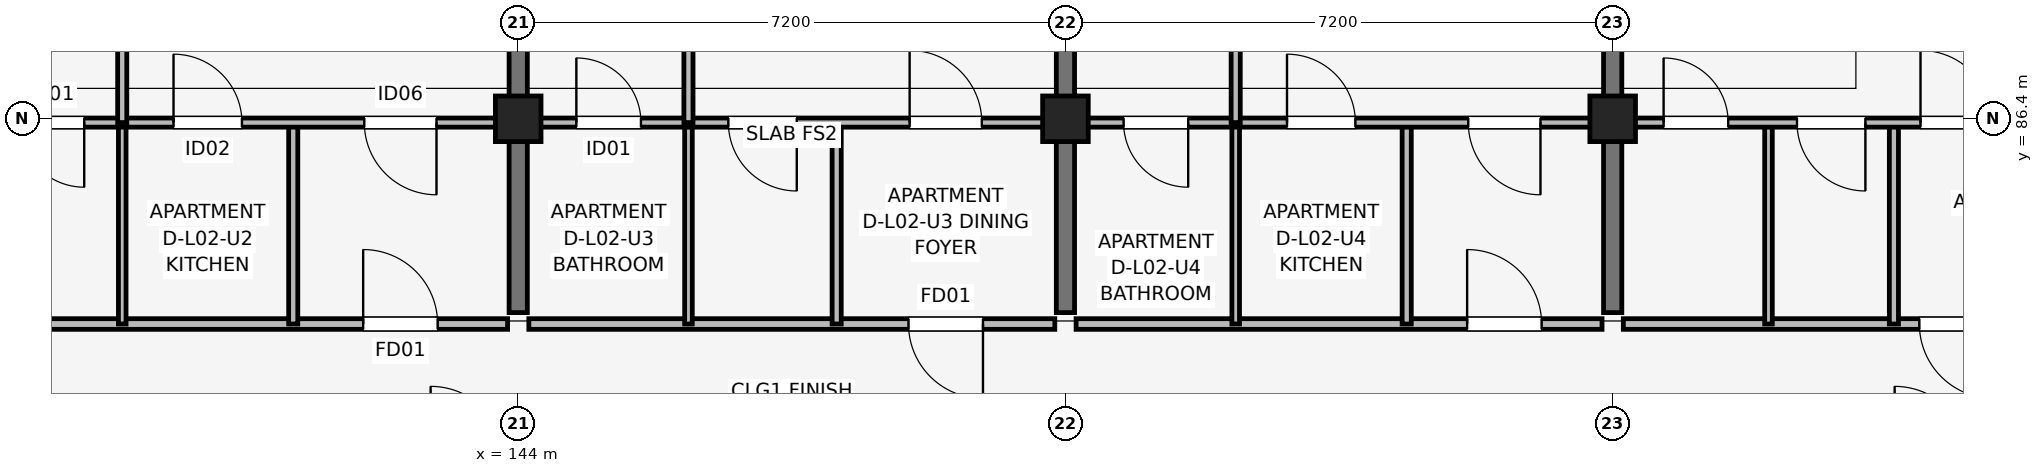
"""IFC4 building model, lengths in metres.
Left out: names, types, materials, properties, quantities, classifications, styles, units other than length and angle.
Written with IfcOpenShell. Run it as: python <this file> out.ifc"""

import sys

from ifc_helpers import new_model, si_unit, direction, frame, frame_2d, origin, origin_2d, place, context, subcontext, project, spatial, rectangle, extrude, element, fill, save


model = new_model("IFC4")
c1 = context("Model", 3, precision=1e-05, world=origin(), true_north=direction((0.0, 1.0)))
c2 = subcontext(c1, "Body", "Model", "MODEL_VIEW")
j1 = project(units=[si_unit("LENGTHUNIT", "METRE"), si_unit("PLANEANGLEUNIT", "RADIAN")], contexts=[c1])
p1 = place(None, origin())
s1 = spatial("IfcSite", under=j1, at=p1, CompositionType="ELEMENT")
p2 = place(p1, origin())
s2 = spatial("IfcBuilding", under=s1, at=p2, CompositionType="ELEMENT")
p3 = place(p2, frame((0.0, 0.0, 8.7)))
s3 = spatial("IfcBuildingStorey", under=s2, at=p3, CompositionType="ELEMENT", Elevation=8.7)
for number, where, z_axis, x_axis in (
    (1, (144.0, 86.4, 0.0), (0.0, 0.0, 1.0), (1.0, 0.0, 0.0)),
    (2, (151.2, 86.4, 0.0), (0.0, 0.0, 1.0), (1.0, 0.0, 0.0)),
    (3, (158.4, 86.4, 0.0), (0.0, 0.0, 1.0), (1.0, 0.0, 0.0)),
):
    element("IfcColumn", number, at=place(p3, frame(where, z_axis=z_axis, x_axis=x_axis)), inside=s3, PredefinedType="COLUMN", context=c2, shape_type="SweptSolid", body=[
        extrude(rectangle(XDim=0.6, YDim=0.6, at=origin_2d()), origin(), (0.0, 0.0, 1.0), 3.15),
    ])
for number, where, z_axis, x_axis in (
    (4, (144.0, 83.85, 0.0), (0.0, 0.0, 1.0), (0.0, 1.0, 0.0)),
    (5, (151.2, 83.85, 0.0), (0.0, 0.0, 1.0), (0.0, 1.0, 0.0)),
    (6, (158.4, 83.85, 0.0), (0.0, 0.0, 1.0), (0.0, 1.0, 0.0)),
):
    element("IfcWall", number, at=place(p3, frame(where, z_axis=z_axis, x_axis=x_axis)), inside=s3, PredefinedType="SHEAR", context=c2, shape_type="SweptSolid", body=[
        extrude(rectangle(XDim=9.4, YDim=0.24, at=frame_2d((4.7, 0.0))), origin(), (0.0, 0.0, 1.0), 3.15),
    ])
p4 = place(p3, frame((136.94, 83.7, 0.0), z_axis=(0.0, 0.0, 1.0), x_axis=(1.0, 0.0, 0.0)))
e7 = element("IfcWall", 7, at=p4, inside=s3, PredefinedType="PARTITIONING", context=c2, shape_type="SweptSolid", body=[
    extrude(rectangle(XDim=6.92, YDim=0.14, at=frame_2d((3.46, 0.0))), origin(), (0.0, 0.0, 1.0), 2.38),
])
p5 = place(p4, frame((5.02, 0.0, 0.0)))
e8 = element("IfcOpeningElement", 8, at=p5, cuts=e7, PredefinedType="OPENING", context=c2, shape_type="SweptSolid", body=[
    extrude(rectangle(XDim=0.98, YDim=2.1, at=frame_2d((0.49, 1.05))), frame((0.0, 0.08, 0.0), z_axis=(0.0, -1.0, 0.0), x_axis=(1.0, 0.0, 0.0)), (0.0, 0.0, 1.0), 0.16),
])
p6 = place(p3, frame((138.79, 83.7, 0.0), z_axis=(0.0, 0.0, 1.0), x_axis=(0.0, 1.0, 0.0)))
e9 = element("IfcWall", 9, at=p6, inside=s3, PredefinedType="PARTITIONING", context=c2, shape_type="SweptSolid", body=[
    extrude(rectangle(XDim=2.65, YDim=0.1, at=frame_2d((1.325, 0.0))), origin(), (0.0, 0.0, 1.0), 2.375),
])
p7 = place(p3, frame((141.04, 83.7, 0.0), z_axis=(0.0, 0.0, 1.0), x_axis=(0.0, 1.0, 0.0)))
e10 = element("IfcWall", 10, at=p7, inside=s3, PredefinedType="PARTITIONING", context=c2, shape_type="SweptSolid", body=[
    extrude(rectangle(XDim=2.65, YDim=0.12, at=frame_2d((1.325, 0.0))), origin(), (0.0, 0.0, 1.0), 2.375),
])
p8 = place(p3, frame((136.94, 86.35, 0.0), z_axis=(0.0, 0.0, 1.0), x_axis=(1.0, 0.0, 0.0)))
e11 = element("IfcWall", 11, at=p8, inside=s3, PredefinedType="PARTITIONING", context=c2, shape_type="SweptSolid", body=[
    extrude(rectangle(XDim=6.92, YDim=0.12, at=frame_2d((3.46, 0.0))), origin(), (0.0, 0.0, 1.0), 2.375),
])
p9 = place(p8, frame((1.35, 0.0, 0.0), z_axis=(0.0, 0.0, 1.0), x_axis=(-1.0, 0.0, 0.0)))
e12 = element("IfcOpeningElement", 12, at=p9, cuts=e11, PredefinedType="OPENING", context=c2, shape_type="SweptSolid", body=[
    extrude(rectangle(XDim=0.85, YDim=2.08, at=frame_2d((0.425, 1.04))), frame((0.0, 0.07, 0.0), z_axis=(0.0, -1.0, 0.0), x_axis=(1.0, 0.0, 0.0)), (0.0, 0.0, 1.0), 0.14),
])
p10 = place(p8, frame((2.525, 0.0, 0.0)))
e13 = element("IfcOpeningElement", 13, at=p10, cuts=e11, PredefinedType="OPENING", context=c2, shape_type="SweptSolid", body=[
    extrude(rectangle(XDim=0.9, YDim=2.08, at=frame_2d((0.45, 1.04))), frame((0.0, 0.07, 0.0), z_axis=(0.0, -1.0, 0.0), x_axis=(1.0, 0.0, 0.0)), (0.0, 0.0, 1.0), 0.14),
])
p11 = place(p8, frame((5.985, 0.0, 0.0), z_axis=(0.0, 0.0, 1.0), x_axis=(-1.0, 0.0, 0.0)))
e14 = element("IfcOpeningElement", 14, at=p11, cuts=e11, PredefinedType="OPENING", context=c2, shape_type="SweptSolid", body=[
    extrude(rectangle(XDim=0.95, YDim=2.08, at=frame_2d((0.475, 1.04))), frame((0.0, 0.07, 0.0), z_axis=(0.0, -1.0, 0.0), x_axis=(1.0, 0.0, 0.0)), (0.0, 0.0, 1.0), 0.14),
])
p12 = place(p3, frame((138.79, 86.35, 0.0), z_axis=(0.0, 0.0, 1.0), x_axis=(0.0, 1.0, 0.0)))
e15 = element("IfcWall", 15, at=p12, inside=s3, PredefinedType="PARTITIONING", context=c2, shape_type="SweptSolid", body=[
    extrude(rectangle(XDim=6.95, YDim=0.12, at=frame_2d((3.475, 0.0))), origin(), (0.0, 0.0, 1.0), 2.375),
])
p13 = place(p12, frame((3.025, 0.0, 0.0)))
e16 = element("IfcOpeningElement", 16, at=p13, cuts=e15, PredefinedType="OPENING", context=c2, shape_type="SweptSolid", body=[
    extrude(rectangle(XDim=0.9, YDim=2.08, at=frame_2d((0.45, 1.04))), frame((0.0, 0.07, 0.0), z_axis=(0.0, -1.0, 0.0), x_axis=(1.0, 0.0, 0.0)), (0.0, 0.0, 1.0), 0.14),
])
p14 = place(p3, frame((144.14, 83.7, 0.0), z_axis=(0.0, 0.0, 1.0), x_axis=(1.0, 0.0, 0.0)))
e17 = element("IfcWall", 17, at=p14, inside=s3, PredefinedType="PARTITIONING", context=c2, shape_type="SweptSolid", body=[
    extrude(rectangle(XDim=6.92, YDim=0.14, at=frame_2d((3.46, 0.0))), origin(), (0.0, 0.0, 1.0), 2.38),
])
p15 = place(p14, frame((5.975, 0.0, 0.0), z_axis=(0.0, 0.0, 1.0), x_axis=(-1.0, 0.0, 0.0)))
e18 = element("IfcOpeningElement", 18, at=p15, cuts=e17, PredefinedType="OPENING", context=c2, shape_type="SweptSolid", body=[
    extrude(rectangle(XDim=0.98, YDim=2.1, at=frame_2d((0.49, 1.05))), frame((0.0, 0.08, 0.0), z_axis=(0.0, -1.0, 0.0), x_axis=(1.0, 0.0, 0.0)), (0.0, 0.0, 1.0), 0.16),
])
p16 = place(p3, frame((146.24, 83.7, 0.0), z_axis=(0.0, 0.0, 1.0), x_axis=(0.0, 1.0, 0.0)))
e19 = element("IfcWall", 19, at=p16, inside=s3, PredefinedType="PARTITIONING", context=c2, shape_type="SweptSolid", body=[
    extrude(rectangle(XDim=2.65, YDim=0.1, at=frame_2d((1.325, 0.0))), origin(), (0.0, 0.0, 1.0), 2.375),
])
p17 = place(p3, frame((148.19, 83.7, 0.0), z_axis=(0.0, 0.0, 1.0), x_axis=(0.0, 1.0, 0.0)))
e20 = element("IfcWall", 20, at=p17, inside=s3, PredefinedType="PARTITIONING", context=c2, shape_type="SweptSolid", body=[
    extrude(rectangle(XDim=2.65, YDim=0.12, at=frame_2d((1.325, 0.0))), origin(), (0.0, 0.0, 1.0), 2.375),
])
p18 = place(p3, frame((144.14, 86.35, 0.0), z_axis=(0.0, 0.0, 1.0), x_axis=(1.0, 0.0, 0.0)))
e21 = element("IfcWall", 21, at=p18, inside=s3, PredefinedType="PARTITIONING", context=c2, shape_type="SweptSolid", body=[
    extrude(rectangle(XDim=6.92, YDim=0.12, at=frame_2d((3.46, 0.0))), origin(), (0.0, 0.0, 1.0), 2.375),
])
p19 = place(p18, frame((0.625, 0.0, 0.0)))
e22 = element("IfcOpeningElement", 22, at=p19, cuts=e21, PredefinedType="OPENING", context=c2, shape_type="SweptSolid", body=[
    extrude(rectangle(XDim=0.85, YDim=2.08, at=frame_2d((0.425, 1.04))), frame((0.0, 0.07, 0.0), z_axis=(0.0, -1.0, 0.0), x_axis=(1.0, 0.0, 0.0)), (0.0, 0.0, 1.0), 0.14),
])
p20 = place(p18, frame((3.525, 0.0, 0.0), z_axis=(0.0, 0.0, 1.0), x_axis=(-1.0, 0.0, 0.0)))
e23 = element("IfcOpeningElement", 23, at=p20, cuts=e21, PredefinedType="OPENING", context=c2, shape_type="SweptSolid", body=[
    extrude(rectangle(XDim=0.9, YDim=2.08, at=frame_2d((0.45, 1.04))), frame((0.0, 0.07, 0.0), z_axis=(0.0, -1.0, 0.0), x_axis=(1.0, 0.0, 0.0)), (0.0, 0.0, 1.0), 0.14),
])
p21 = place(p18, frame((5.01, 0.0, 0.0)))
e24 = element("IfcOpeningElement", 24, at=p21, cuts=e21, PredefinedType="OPENING", context=c2, shape_type="SweptSolid", body=[
    extrude(rectangle(XDim=0.95, YDim=2.08, at=frame_2d((0.475, 1.04))), frame((0.0, 0.07, 0.0), z_axis=(0.0, -1.0, 0.0), x_axis=(1.0, 0.0, 0.0)), (0.0, 0.0, 1.0), 0.14),
])
p22 = place(p3, frame((146.24, 86.35, 0.0), z_axis=(0.0, 0.0, 1.0), x_axis=(0.0, 1.0, 0.0)))
e25 = element("IfcWall", 25, at=p22, inside=s3, PredefinedType="PARTITIONING", context=c2, shape_type="SweptSolid", body=[
    extrude(rectangle(XDim=6.95, YDim=0.12, at=frame_2d((3.475, 0.0))), origin(), (0.0, 0.0, 1.0), 2.375),
])
p23 = place(p22, frame((3.925, 0.0, 0.0), z_axis=(0.0, 0.0, 1.0), x_axis=(-1.0, 0.0, 0.0)))
e26 = element("IfcOpeningElement", 26, at=p23, cuts=e25, PredefinedType="OPENING", context=c2, shape_type="SweptSolid", body=[
    extrude(rectangle(XDim=0.9, YDim=2.08, at=frame_2d((0.45, 1.04))), frame((0.0, 0.07, 0.0), z_axis=(0.0, -1.0, 0.0), x_axis=(1.0, 0.0, 0.0)), (0.0, 0.0, 1.0), 0.14),
])
p24 = place(p3, frame((151.34, 83.7, 0.0), z_axis=(0.0, 0.0, 1.0), x_axis=(1.0, 0.0, 0.0)))
e27 = element("IfcWall", 27, at=p24, inside=s3, PredefinedType="PARTITIONING", context=c2, shape_type="SweptSolid", body=[
    extrude(rectangle(XDim=6.92, YDim=0.14, at=frame_2d((3.46, 0.0))), origin(), (0.0, 0.0, 1.0), 2.38),
])
p25 = place(p24, frame((5.145, 0.0, 0.0)))
e28 = element("IfcOpeningElement", 28, at=p25, cuts=e27, PredefinedType="OPENING", context=c2, shape_type="SweptSolid", body=[
    extrude(rectangle(XDim=0.98, YDim=2.1, at=frame_2d((0.49, 1.05))), frame((0.0, 0.08, 0.0), z_axis=(0.0, -1.0, 0.0), x_axis=(1.0, 0.0, 0.0)), (0.0, 0.0, 1.0), 0.16),
])
p26 = place(p3, frame((153.44, 83.7, 0.0), z_axis=(0.0, 0.0, 1.0), x_axis=(0.0, 1.0, 0.0)))
e29 = element("IfcWall", 29, at=p26, inside=s3, PredefinedType="PARTITIONING", context=c2, shape_type="SweptSolid", body=[
    extrude(rectangle(XDim=2.65, YDim=0.1, at=frame_2d((1.325, 0.0))), origin(), (0.0, 0.0, 1.0), 2.375),
])
p27 = place(p3, frame((155.69, 83.7, 0.0), z_axis=(0.0, 0.0, 1.0), x_axis=(0.0, 1.0, 0.0)))
e30 = element("IfcWall", 30, at=p27, inside=s3, PredefinedType="PARTITIONING", context=c2, shape_type="SweptSolid", body=[
    extrude(rectangle(XDim=2.65, YDim=0.12, at=frame_2d((1.325, 0.0))), origin(), (0.0, 0.0, 1.0), 2.375),
])
p28 = place(p3, frame((151.34, 86.35, 0.0), z_axis=(0.0, 0.0, 1.0), x_axis=(1.0, 0.0, 0.0)))
e31 = element("IfcWall", 31, at=p28, inside=s3, PredefinedType="PARTITIONING", context=c2, shape_type="SweptSolid", body=[
    extrude(rectangle(XDim=6.92, YDim=0.12, at=frame_2d((3.46, 0.0))), origin(), (0.0, 0.0, 1.0), 2.375),
])
p29 = place(p28, frame((1.475, 0.0, 0.0), z_axis=(0.0, 0.0, 1.0), x_axis=(-1.0, 0.0, 0.0)))
e32 = element("IfcOpeningElement", 32, at=p29, cuts=e31, PredefinedType="OPENING", context=c2, shape_type="SweptSolid", body=[
    extrude(rectangle(XDim=0.85, YDim=2.08, at=frame_2d((0.425, 1.04))), frame((0.0, 0.07, 0.0), z_axis=(0.0, -1.0, 0.0), x_axis=(1.0, 0.0, 0.0)), (0.0, 0.0, 1.0), 0.14),
])
p30 = place(p28, frame((2.775, 0.0, 0.0)))
e33 = element("IfcOpeningElement", 33, at=p30, cuts=e31, PredefinedType="OPENING", context=c2, shape_type="SweptSolid", body=[
    extrude(rectangle(XDim=0.9, YDim=2.08, at=frame_2d((0.45, 1.04))), frame((0.0, 0.07, 0.0), z_axis=(0.0, -1.0, 0.0), x_axis=(1.0, 0.0, 0.0)), (0.0, 0.0, 1.0), 0.14),
])
p31 = place(p28, frame((6.11, 0.0, 0.0), z_axis=(0.0, 0.0, 1.0), x_axis=(-1.0, 0.0, 0.0)))
e34 = element("IfcOpeningElement", 34, at=p31, cuts=e31, PredefinedType="OPENING", context=c2, shape_type="SweptSolid", body=[
    extrude(rectangle(XDim=0.95, YDim=2.08, at=frame_2d((0.475, 1.04))), frame((0.0, 0.07, 0.0), z_axis=(0.0, -1.0, 0.0), x_axis=(1.0, 0.0, 0.0)), (0.0, 0.0, 1.0), 0.14),
])
p32 = place(p3, frame((153.44, 86.35, 0.0), z_axis=(0.0, 0.0, 1.0), x_axis=(0.0, 1.0, 0.0)))
e35 = element("IfcWall", 35, at=p32, inside=s3, PredefinedType="PARTITIONING", context=c2, shape_type="SweptSolid", body=[
    extrude(rectangle(XDim=6.95, YDim=0.12, at=frame_2d((3.475, 0.0))), origin(), (0.0, 0.0, 1.0), 2.375),
])
p33 = place(p32, frame((3.025, 0.0, 0.0)))
e36 = element("IfcOpeningElement", 36, at=p33, cuts=e35, PredefinedType="OPENING", context=c2, shape_type="SweptSolid", body=[
    extrude(rectangle(XDim=0.9, YDim=2.08, at=frame_2d((0.45, 1.04))), frame((0.0, 0.07, 0.0), z_axis=(0.0, -1.0, 0.0), x_axis=(1.0, 0.0, 0.0)), (0.0, 0.0, 1.0), 0.14),
])
p34 = place(p3, frame((158.54, 83.7, 0.0), z_axis=(0.0, 0.0, 1.0), x_axis=(1.0, 0.0, 0.0)))
e37 = element("IfcWall", 37, at=p34, inside=s3, PredefinedType="PARTITIONING", context=c2, shape_type="SweptSolid", body=[
    extrude(rectangle(XDim=6.92, YDim=0.14, at=frame_2d((3.46, 0.0))), origin(), (0.0, 0.0, 1.0), 2.38),
])
p35 = place(p34, frame((4.875, 0.0, 0.0), z_axis=(0.0, 0.0, 1.0), x_axis=(-1.0, 0.0, 0.0)))
e38 = element("IfcOpeningElement", 38, at=p35, cuts=e37, PredefinedType="OPENING", context=c2, shape_type="SweptSolid", body=[
    extrude(rectangle(XDim=0.98, YDim=2.1, at=frame_2d((0.49, 1.05))), frame((0.0, 0.08, 0.0), z_axis=(0.0, -1.0, 0.0), x_axis=(1.0, 0.0, 0.0)), (0.0, 0.0, 1.0), 0.16),
])
p36 = place(p3, frame((160.45, 83.7, 0.0), z_axis=(0.0, 0.0, 1.0), x_axis=(0.0, 1.0, 0.0)))
e39 = element("IfcWall", 39, at=p36, inside=s3, PredefinedType="PARTITIONING", context=c2, shape_type="SweptSolid", body=[
    extrude(rectangle(XDim=2.65, YDim=0.1, at=frame_2d((1.325, 0.0))), origin(), (0.0, 0.0, 1.0), 2.375),
])
p37 = place(p3, frame((162.1, 83.7, 0.0), z_axis=(0.0, 0.0, 1.0), x_axis=(0.0, 1.0, 0.0)))
e40 = element("IfcWall", 40, at=p37, inside=s3, PredefinedType="PARTITIONING", context=c2, shape_type="SweptSolid", body=[
    extrude(rectangle(XDim=2.65, YDim=0.12, at=frame_2d((1.325, 0.0))), origin(), (0.0, 0.0, 1.0), 2.375),
])
p38 = place(p3, frame((158.54, 86.35, 0.0), z_axis=(0.0, 0.0, 1.0), x_axis=(1.0, 0.0, 0.0)))
e41 = element("IfcWall", 41, at=p38, inside=s3, PredefinedType="PARTITIONING", context=c2, shape_type="SweptSolid", body=[
    extrude(rectangle(XDim=6.92, YDim=0.12, at=frame_2d((3.46, 0.0))), origin(), (0.0, 0.0, 1.0), 2.375),
])
p39 = place(p38, frame((0.53, 0.0, 0.0)))
e42 = element("IfcOpeningElement", 42, at=p39, cuts=e41, PredefinedType="OPENING", context=c2, shape_type="SweptSolid", body=[
    extrude(rectangle(XDim=0.85, YDim=2.08, at=frame_2d((0.425, 1.04))), frame((0.0, 0.07, 0.0), z_axis=(0.0, -1.0, 0.0), x_axis=(1.0, 0.0, 0.0)), (0.0, 0.0, 1.0), 0.14),
])
p40 = place(p38, frame((3.185, 0.0, 0.0), z_axis=(0.0, 0.0, 1.0), x_axis=(-1.0, 0.0, 0.0)))
e43 = element("IfcOpeningElement", 43, at=p40, cuts=e41, PredefinedType="OPENING", context=c2, shape_type="SweptSolid", body=[
    extrude(rectangle(XDim=0.9, YDim=2.08, at=frame_2d((0.45, 1.04))), frame((0.0, 0.07, 0.0), z_axis=(0.0, -1.0, 0.0), x_axis=(1.0, 0.0, 0.0)), (0.0, 0.0, 1.0), 0.14),
])
p41 = place(p38, frame((3.91, 0.0, 0.0)))
e44 = element("IfcOpeningElement", 44, at=p41, cuts=e41, PredefinedType="OPENING", context=c2, shape_type="SweptSolid", body=[
    extrude(rectangle(XDim=0.95, YDim=2.08, at=frame_2d((0.475, 1.04))), frame((0.0, 0.07, 0.0), z_axis=(0.0, -1.0, 0.0), x_axis=(1.0, 0.0, 0.0)), (0.0, 0.0, 1.0), 0.14),
])
p42 = place(p5, origin())
e45 = element("IfcDoor", 45, at=p42, inside=s3, OperationType="SINGLE_SWING_LEFT", PredefinedType="DOOR", context=c2, shape_type="SweptSolid", body=[
    extrude(rectangle(XDim=0.98, YDim=2.1, at=frame_2d((0.49, 1.05))), frame((0.0, 0.025, 0.0), z_axis=(0.0, -1.0, 0.0), x_axis=(1.0, 0.0, 0.0)), (0.0, 0.0, 1.0), 0.05),
])
fill(e8, e45)
p43 = place(p9, origin())
e46 = element("IfcDoor", 46, at=p43, inside=s3, OperationType="SINGLE_SWING_RIGHT", PredefinedType="DOOR", context=c2, shape_type="SweptSolid", body=[
    extrude(rectangle(XDim=0.85, YDim=2.08, at=frame_2d((0.425, 1.04))), frame((0.0, 0.025, 0.0), z_axis=(0.0, -1.0, 0.0), x_axis=(1.0, 0.0, 0.0)), (0.0, 0.0, 1.0), 0.05),
])
fill(e12, e46)
p44 = place(p10, origin())
e47 = element("IfcDoor", 47, at=p44, inside=s3, OperationType="SINGLE_SWING_LEFT", PredefinedType="DOOR", context=c2, shape_type="SweptSolid", body=[
    extrude(rectangle(XDim=0.9, YDim=2.08, at=frame_2d((0.45, 1.04))), frame((0.0, 0.025, 0.0), z_axis=(0.0, -1.0, 0.0), x_axis=(1.0, 0.0, 0.0)), (0.0, 0.0, 1.0), 0.05),
])
fill(e13, e47)
p45 = place(p11, origin())
e48 = element("IfcDoor", 48, at=p45, inside=s3, OperationType="SINGLE_SWING_RIGHT", PredefinedType="DOOR", context=c2, shape_type="SweptSolid", body=[
    extrude(rectangle(XDim=0.95, YDim=2.08, at=frame_2d((0.475, 1.04))), frame((0.0, 0.025, 0.0), z_axis=(0.0, -1.0, 0.0), x_axis=(1.0, 0.0, 0.0)), (0.0, 0.0, 1.0), 0.05),
])
fill(e14, e48)
p46 = place(p15, origin())
e49 = element("IfcDoor", 49, at=p46, inside=s3, OperationType="SINGLE_SWING_RIGHT", PredefinedType="DOOR", context=c2, shape_type="SweptSolid", body=[
    extrude(rectangle(XDim=0.98, YDim=2.1, at=frame_2d((0.49, 1.05))), frame((0.0, 0.025, 0.0), z_axis=(0.0, -1.0, 0.0), x_axis=(1.0, 0.0, 0.0)), (0.0, 0.0, 1.0), 0.05),
])
fill(e18, e49)
p47 = place(p19, origin())
e50 = element("IfcDoor", 50, at=p47, inside=s3, OperationType="SINGLE_SWING_LEFT", PredefinedType="DOOR", context=c2, shape_type="SweptSolid", body=[
    extrude(rectangle(XDim=0.85, YDim=2.08, at=frame_2d((0.425, 1.04))), frame((0.0, 0.025, 0.0), z_axis=(0.0, -1.0, 0.0), x_axis=(1.0, 0.0, 0.0)), (0.0, 0.0, 1.0), 0.05),
])
fill(e22, e50)
p48 = place(p20, origin())
e51 = element("IfcDoor", 51, at=p48, inside=s3, OperationType="SINGLE_SWING_RIGHT", PredefinedType="DOOR", context=c2, shape_type="SweptSolid", body=[
    extrude(rectangle(XDim=0.9, YDim=2.08, at=frame_2d((0.45, 1.04))), frame((0.0, 0.025, 0.0), z_axis=(0.0, -1.0, 0.0), x_axis=(1.0, 0.0, 0.0)), (0.0, 0.0, 1.0), 0.05),
])
fill(e23, e51)
p49 = place(p21, origin())
e52 = element("IfcDoor", 52, at=p49, inside=s3, OperationType="SINGLE_SWING_LEFT", PredefinedType="DOOR", context=c2, shape_type="SweptSolid", body=[
    extrude(rectangle(XDim=0.95, YDim=2.08, at=frame_2d((0.475, 1.04))), frame((0.0, 0.025, 0.0), z_axis=(0.0, -1.0, 0.0), x_axis=(1.0, 0.0, 0.0)), (0.0, 0.0, 1.0), 0.05),
])
fill(e24, e52)
p50 = place(p25, origin())
e53 = element("IfcDoor", 53, at=p50, inside=s3, OperationType="SINGLE_SWING_LEFT", PredefinedType="DOOR", context=c2, shape_type="SweptSolid", body=[
    extrude(rectangle(XDim=0.98, YDim=2.1, at=frame_2d((0.49, 1.05))), frame((0.0, 0.025, 0.0), z_axis=(0.0, -1.0, 0.0), x_axis=(1.0, 0.0, 0.0)), (0.0, 0.0, 1.0), 0.05),
])
fill(e28, e53)
p51 = place(p29, origin())
e54 = element("IfcDoor", 54, at=p51, inside=s3, OperationType="SINGLE_SWING_RIGHT", PredefinedType="DOOR", context=c2, shape_type="SweptSolid", body=[
    extrude(rectangle(XDim=0.85, YDim=2.08, at=frame_2d((0.425, 1.04))), frame((0.0, 0.025, 0.0), z_axis=(0.0, -1.0, 0.0), x_axis=(1.0, 0.0, 0.0)), (0.0, 0.0, 1.0), 0.05),
])
fill(e32, e54)
p52 = place(p30, origin())
e55 = element("IfcDoor", 55, at=p52, inside=s3, OperationType="SINGLE_SWING_LEFT", PredefinedType="DOOR", context=c2, shape_type="SweptSolid", body=[
    extrude(rectangle(XDim=0.9, YDim=2.08, at=frame_2d((0.45, 1.04))), frame((0.0, 0.025, 0.0), z_axis=(0.0, -1.0, 0.0), x_axis=(1.0, 0.0, 0.0)), (0.0, 0.0, 1.0), 0.05),
])
fill(e33, e55)
p53 = place(p31, origin())
e56 = element("IfcDoor", 56, at=p53, inside=s3, OperationType="SINGLE_SWING_RIGHT", PredefinedType="DOOR", context=c2, shape_type="SweptSolid", body=[
    extrude(rectangle(XDim=0.95, YDim=2.08, at=frame_2d((0.475, 1.04))), frame((0.0, 0.025, 0.0), z_axis=(0.0, -1.0, 0.0), x_axis=(1.0, 0.0, 0.0)), (0.0, 0.0, 1.0), 0.05),
])
fill(e34, e56)
p54 = place(p35, origin())
e57 = element("IfcDoor", 57, at=p54, inside=s3, OperationType="SINGLE_SWING_RIGHT", PredefinedType="DOOR", context=c2, shape_type="SweptSolid", body=[
    extrude(rectangle(XDim=0.98, YDim=2.1, at=frame_2d((0.49, 1.05))), frame((0.0, 0.025, 0.0), z_axis=(0.0, -1.0, 0.0), x_axis=(1.0, 0.0, 0.0)), (0.0, 0.0, 1.0), 0.05),
])
fill(e38, e57)
p55 = place(p39, origin())
e58 = element("IfcDoor", 58, at=p55, inside=s3, OperationType="SINGLE_SWING_LEFT", PredefinedType="DOOR", context=c2, shape_type="SweptSolid", body=[
    extrude(rectangle(XDim=0.85, YDim=2.08, at=frame_2d((0.425, 1.04))), frame((0.0, 0.025, 0.0), z_axis=(0.0, -1.0, 0.0), x_axis=(1.0, 0.0, 0.0)), (0.0, 0.0, 1.0), 0.05),
])
fill(e42, e58)
p56 = place(p40, origin())
e59 = element("IfcDoor", 59, at=p56, inside=s3, OperationType="SINGLE_SWING_RIGHT", PredefinedType="DOOR", context=c2, shape_type="SweptSolid", body=[
    extrude(rectangle(XDim=0.9, YDim=2.08, at=frame_2d((0.45, 1.04))), frame((0.0, 0.025, 0.0), z_axis=(0.0, -1.0, 0.0), x_axis=(1.0, 0.0, 0.0)), (0.0, 0.0, 1.0), 0.05),
])
fill(e43, e59)
p57 = place(p41, origin())
e60 = element("IfcDoor", 60, at=p57, inside=s3, OperationType="SINGLE_SWING_LEFT", PredefinedType="DOOR", context=c2, shape_type="SweptSolid", body=[
    extrude(rectangle(XDim=0.95, YDim=2.08, at=frame_2d((0.475, 1.04))), frame((0.0, 0.025, 0.0), z_axis=(0.0, -1.0, 0.0), x_axis=(1.0, 0.0, 0.0)), (0.0, 0.0, 1.0), 0.05),
])
fill(e44, e60)
save(model, sys.argv[1])
